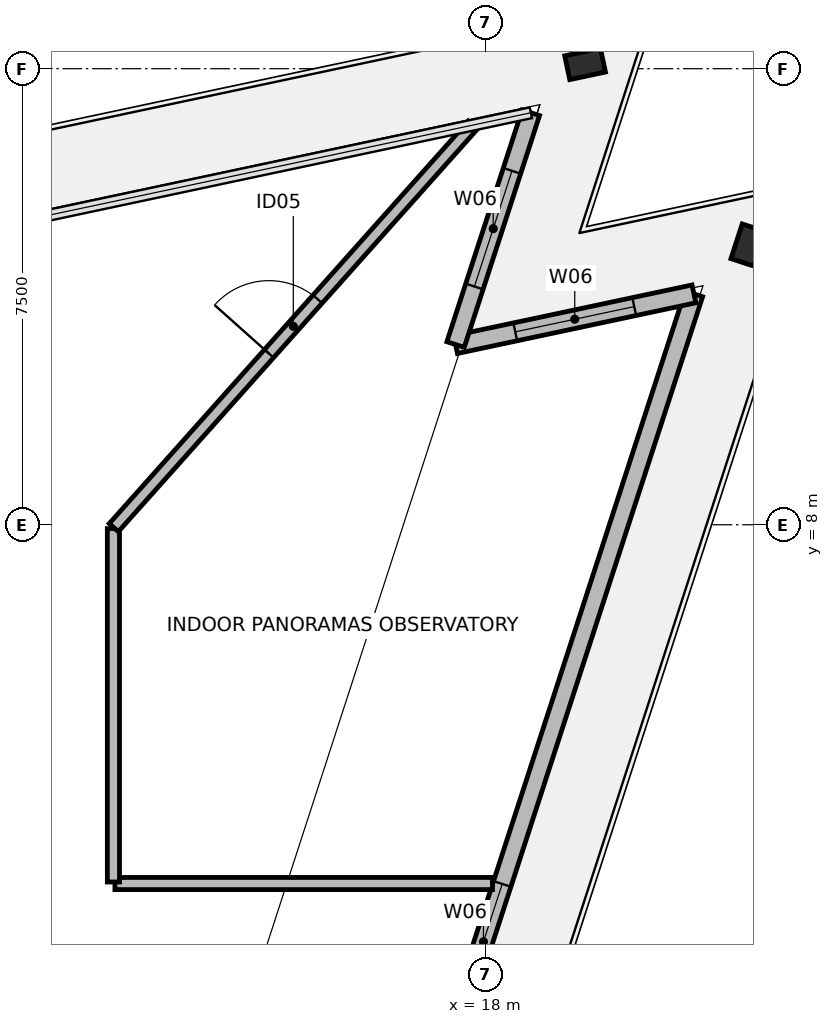
"""IFC4 building model, lengths in metres.
Left out: names, types, materials, properties, quantities, classifications, styles, units other than length and angle.
Written with IfcOpenShell. Run it as: python <this file> out.ifc"""

import sys

from ifc_helpers import new_model, si_unit, direction, frame, frame_2d, origin, origin_2d, place, context, subcontext, project, spatial, rectangle, hollow_rectangle, extrude, element, fill, save


model = new_model("IFC4")
c1 = context("Model", 3, precision=1e-05, world=origin(), true_north=direction((0.0, 1.0)))
c2 = subcontext(c1, "Body", "Model", "MODEL_VIEW")
j1 = project(units=[si_unit("LENGTHUNIT", "METRE"), si_unit("PLANEANGLEUNIT", "RADIAN")], contexts=[c1])
p1 = place(None, origin())
s1 = spatial("IfcSite", under=j1, at=p1, CompositionType="ELEMENT")
p2 = place(p1, origin())
s2 = spatial("IfcBuilding", under=s1, at=p2, CompositionType="ELEMENT")
p3 = place(p2, frame((0.0, 0.0, 306.3)))
s3 = spatial("IfcBuildingStorey", under=s2, at=p3, CompositionType="ELEMENT", Elevation=306.3)
for number, where, z_axis, x_axis in (
    (1, (22.319, 12.6, 0.0), (0.0, 0.0, 1.0), (0.309, 0.951, 0.0)),
    (2, (19.637, 15.578, 0.0), (0.0, 0.0, 1.0), (0.978, 0.208, 0.0)),
):
    element("IfcColumn", number, at=place(p3, frame(where, z_axis=z_axis, x_axis=x_axis)), inside=s3, PredefinedType="COLUMN", context=c2, shape_type="SweptSolid", body=[
        extrude(hollow_rectangle(XDim=0.4, YDim=0.6, WallThickness=0.03, at=origin_2d()), origin(), (0.0, 0.0, 1.0), 4.55),
    ])
p4 = place(p3, frame((7.58, -30.822, 0.0), z_axis=(0.0, 0.0, 1.0), x_axis=(0.309018932156, 0.95105588667, 0.0)))
e3 = element("IfcWall", 3, at=p4, inside=s3, PredefinedType="STANDARD", context=c2, shape_type="SweptSolid", body=[
    extrude(rectangle(XDim=44.812, YDim=0.3, at=frame_2d((22.406, 0.0))), origin(), (0.0, 0.0, 1.0), 3.805),
])
p5 = place(p4, frame((21.606, 0.0, 0.0)))
e4 = element("IfcOpeningElement", 4, at=p5, cuts=e3, PredefinedType="OPENING", context=c2, shape_type="SweptSolid", body=[
    extrude(rectangle(XDim=1.6, YDim=2.3, at=frame_2d((0.8, 1.15))), frame((0.0, 0.16, 0.0), z_axis=(0.0, -1.0, 0.0), x_axis=(1.0, 0.0, 0.0)), (0.0, 0.0, 1.0), 0.32),
])
p6 = place(p4, frame((10.203, 0.0, 0.85)))
e5 = element("IfcOpeningElement", 5, at=p6, cuts=e3, PredefinedType="OPENING", context=c2, shape_type="SweptSolid", body=[
    extrude(rectangle(XDim=2.0, YDim=2.4, at=frame_2d((1.0, 1.2))), frame((0.0, 0.16, 0.0), z_axis=(0.0, -1.0, 0.0), x_axis=(1.0, 0.0, 0.0)), (0.0, 0.0, 1.0), 0.32),
])
p7 = place(p4, frame((32.609, 0.0, 0.85)))
e6 = element("IfcOpeningElement", 6, at=p7, cuts=e3, PredefinedType="OPENING", context=c2, shape_type="SweptSolid", body=[
    extrude(rectangle(XDim=2.0, YDim=2.4, at=frame_2d((1.0, 1.2))), frame((0.0, 0.16, 0.0), z_axis=(0.0, -1.0, 0.0), x_axis=(1.0, 0.0, 0.0)), (0.0, 0.0, 1.0), 0.32),
])
p8 = place(p3, frame((21.427, 11.797, 0.0), z_axis=(0.0, 0.0, 1.0), x_axis=(-0.97815049033, -0.207898095871, 0.0)))
e7 = element("IfcWall", 7, at=p8, inside=s3, PredefinedType="STANDARD", context=c2, shape_type="SweptSolid", body=[
    extrude(rectangle(XDim=4.008, YDim=0.3, at=frame_2d((2.004, 0.0))), origin(), (0.0, 0.0, 1.0), 3.805),
])
p9 = place(p8, frame((1.004, 0.0, 0.85)))
e8 = element("IfcOpeningElement", 8, at=p9, cuts=e7, PredefinedType="OPENING", context=c2, shape_type="SweptSolid", body=[
    extrude(rectangle(XDim=2.0, YDim=2.4, at=frame_2d((1.0, 1.2))), frame((0.0, 0.16, 0.0), z_axis=(0.0, -1.0, 0.0), x_axis=(1.0, 0.0, 0.0)), (0.0, 0.0, 1.0), 0.32),
])
p10 = place(p3, frame((17.507, 10.963, 0.0), z_axis=(0.0, 0.0, 1.0), x_axis=(0.309018580232, 0.951056001018, 0.0)))
e9 = element("IfcWall", 9, at=p10, inside=s3, PredefinedType="STANDARD", context=c2, shape_type="SweptSolid", body=[
    extrude(rectangle(XDim=4.008, YDim=0.3, at=frame_2d((2.004, 0.0))), origin(), (0.0, 0.0, 1.0), 3.805),
])
p11 = place(p10, frame((1.004, 0.0, 0.85)))
e10 = element("IfcOpeningElement", 10, at=p11, cuts=e9, PredefinedType="OPENING", context=c2, shape_type="SweptSolid", body=[
    extrude(rectangle(XDim=2.0, YDim=2.4, at=frame_2d((1.0, 1.2))), frame((0.0, 0.16, 0.0), z_axis=(0.0, -1.0, 0.0), x_axis=(1.0, 0.0, 0.0)), (0.0, 0.0, 1.0), 0.32),
])
p12 = place(p3, frame((18.114, 2.1, 0.0), z_axis=(0.0, 0.0, 1.0), x_axis=(-1.0, 0.0, 0.0)))
e11 = element("IfcWall", 11, at=p12, inside=s3, PredefinedType="PARTITIONING", context=c2, shape_type="SweptSolid", body=[
    extrude(rectangle(XDim=6.209, YDim=0.2, at=frame_2d((3.104, 0.0))), origin(), (0.0, 0.0, 1.0), 4.065),
])
p13 = place(p3, frame((11.88, 2.125, 0.0), z_axis=(0.0, 0.0, 1.0), x_axis=(0.0, 1.0, 0.0)))
e12 = element("IfcWall", 12, at=p13, inside=s3, PredefinedType="PARTITIONING", context=c2, shape_type="SweptSolid", body=[
    extrude(rectangle(XDim=5.811, YDim=0.2, at=frame_2d((2.906, 0.0))), origin(), (0.0, 0.0, 1.0), 4.31),
])
p14 = place(p3, frame((11.886, 7.953, 0.0), z_axis=(0.0, 0.0, 1.0), x_axis=(0.66569355976, 0.746225223706, 0.0)))
e13 = element("IfcWall", 13, at=p14, inside=s3, PredefinedType="PARTITIONING", context=c2, shape_type="SweptSolid", body=[
    extrude(rectangle(XDim=8.871, YDim=0.2, at=frame_2d((4.435, 0.0))), origin(), (0.0, 0.0, 1.0), 3.805),
])
p15 = place(p14, frame((3.835, 0.0, 0.0)))
e14 = element("IfcOpeningElement", 14, at=p15, cuts=e13, PredefinedType="OPENING", context=c2, shape_type="SweptSolid", body=[
    extrude(rectangle(XDim=1.2, YDim=2.15, at=frame_2d((0.6, 1.075))), frame((0.0, 0.11, 0.0), z_axis=(0.0, -1.0, 0.0), x_axis=(1.0, 0.0, 0.0)), (0.0, 0.0, 1.0), 0.22),
])
p16 = place(p7, origin())
e15 = element("IfcWindow", 15, at=p16, inside=s3, PartitioningType="SINGLE_PANEL", PredefinedType="WINDOW", context=c2, shape_type="SweptSolid", body=[
    extrude(rectangle(XDim=2.0, YDim=2.4, at=frame_2d((1.0, 1.2))), frame((0.0, 0.03, 0.0), z_axis=(0.0, -1.0, 0.0), x_axis=(1.0, 0.0, 0.0)), (0.0, 0.0, 1.0), 0.06),
])
fill(e6, e15)
p17 = place(p9, origin())
e16 = element("IfcWindow", 16, at=p17, inside=s3, PartitioningType="SINGLE_PANEL", PredefinedType="WINDOW", context=c2, shape_type="SweptSolid", body=[
    extrude(rectangle(XDim=2.0, YDim=2.4, at=frame_2d((1.0, 1.2))), frame((0.0, 0.03, 0.0), z_axis=(0.0, -1.0, 0.0), x_axis=(1.0, 0.0, 0.0)), (0.0, 0.0, 1.0), 0.06),
])
fill(e8, e16)
p18 = place(p11, origin())
e17 = element("IfcWindow", 17, at=p18, inside=s3, PartitioningType="SINGLE_PANEL", PredefinedType="WINDOW", context=c2, shape_type="SweptSolid", body=[
    extrude(rectangle(XDim=2.0, YDim=2.4, at=frame_2d((1.0, 1.2))), frame((0.0, 0.03, 0.0), z_axis=(0.0, -1.0, 0.0), x_axis=(1.0, 0.0, 0.0)), (0.0, 0.0, 1.0), 0.06),
])
fill(e10, e17)
p19 = place(p15, origin())
e18 = element("IfcDoor", 18, at=p19, inside=s3, OperationType="SINGLE_SWING_LEFT", PredefinedType="DOOR", context=c2, shape_type="SweptSolid", body=[
    extrude(rectangle(XDim=1.2, YDim=2.15, at=frame_2d((0.6, 1.075))), frame((0.0, 0.025, 0.0), z_axis=(0.0, -1.0, 0.0), x_axis=(1.0, 0.0, 0.0)), (0.0, 0.0, 1.0), 0.05),
])
fill(e14, e18)
save(model, sys.argv[1])
